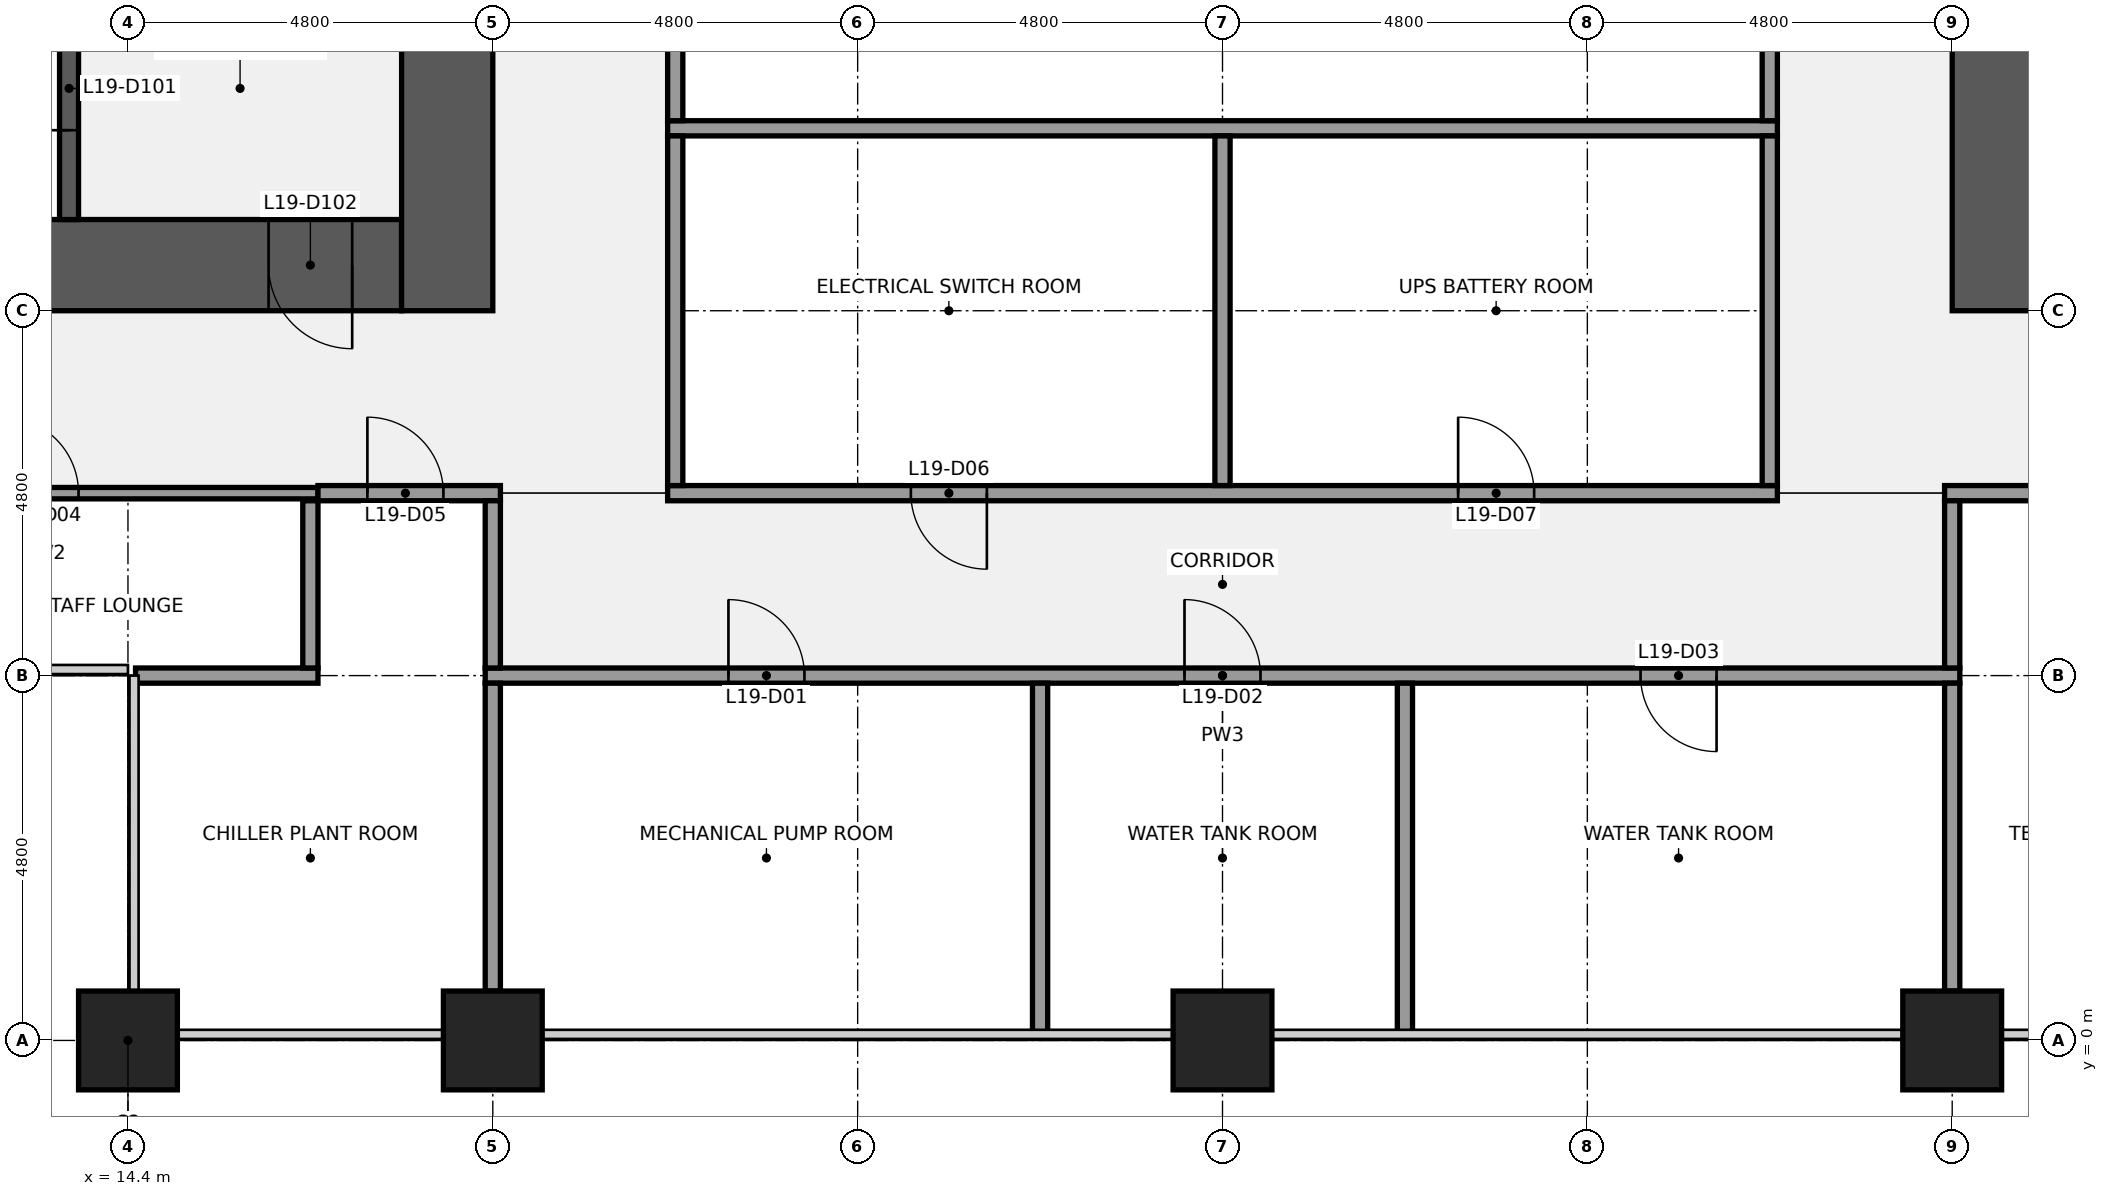
"""IFC4 building model, lengths in metres.
Left out: names, types, materials, properties, quantities, classifications, styles, units other than length and angle.
Written with IfcOpenShell. Run it as: python <this file> out.ifc"""

import sys

from ifc_helpers import new_model, si_unit, direction, frame, frame_2d, origin, origin_2d, place, context, subcontext, project, spatial, rectangle, extrude, element, fill, save


model = new_model("IFC4")
c1 = context("Model", 3, precision=1e-05, world=origin(), true_north=direction((0.0, 1.0)))
c2 = subcontext(c1, "Body", "Model", "MODEL_VIEW")
j1 = project(units=[si_unit("LENGTHUNIT", "METRE"), si_unit("PLANEANGLEUNIT", "RADIAN")], contexts=[c1])
p1 = place(None, origin())
s1 = spatial("IfcSite", under=j1, at=p1, CompositionType="ELEMENT")
p2 = place(p1, origin())
s2 = spatial("IfcBuilding", under=s1, at=p2, CompositionType="ELEMENT")
p3 = place(p2, frame((0.0, 0.0, 87.0)))
s3 = spatial("IfcBuildingStorey", under=s2, at=p3, CompositionType="ELEMENT", Elevation=87.0)
for number, where, z_axis, x_axis in (
    (1, (14.4, 0.0, 0.0), (0.0, 0.0, 1.0), (1.0, 0.0, 0.0)),
    (2, (19.2, 0.0, 0.0), (0.0, 0.0, 1.0), (1.0, 0.0, 0.0)),
    (3, (28.8, 0.0, 0.0), (0.0, 0.0, 1.0), (1.0, 0.0, 0.0)),
    (4, (38.4, 0.0, 0.0), (0.0, 0.0, 1.0), (1.0, 0.0, 0.0)),
):
    element("IfcColumn", number, at=place(p3, frame(where, z_axis=z_axis, x_axis=x_axis)), inside=s3, PredefinedType="COLUMN", context=c2, shape_type="SweptSolid", body=[
        extrude(rectangle(XDim=1.3, YDim=1.3, at=origin_2d()), origin(), (0.0, 0.0, 1.0), 4.5),
    ])
p4 = place(p3, frame((18.0, 10.2, 0.0), z_axis=(0.0, 0.0, 1.0), x_axis=(-1.0, 0.0, 0.0)))
e5 = element("IfcWall", 5, at=p4, inside=s3, PredefinedType="SHEAR", context=c2, shape_type="SweptSolid", body=[
    extrude(rectangle(XDim=8.4, YDim=1.2, at=frame_2d((4.2, 0.0))), origin(), (0.0, 0.0, 1.0), 4.1),
])
p5 = place(p4, frame((0.65, 0.0, 0.0)))
e6 = element("IfcOpeningElement", 6, at=p5, cuts=e5, PredefinedType="OPENING", context=c2, shape_type="SweptSolid", body=[
    extrude(rectangle(XDim=1.1, YDim=2.1, at=frame_2d((0.55, 1.05))), frame((0.0, 0.61, 0.0), z_axis=(0.0, -1.0, 0.0), x_axis=(1.0, 0.0, 0.0)), (0.0, 0.0, 1.0), 1.22),
])
p6 = place(p3, frame((18.6, 38.4, 0.0), z_axis=(0.0, 0.0, 1.0), x_axis=(0.0, -1.0, 0.0)))
e7 = element("IfcWall", 7, at=p6, inside=s3, PredefinedType="SHEAR", context=c2, shape_type="SweptSolid", body=[
    extrude(rectangle(XDim=28.8, YDim=1.2, at=frame_2d((14.4, 0.0))), origin(), (0.0, 0.0, 1.0), 4.1),
])
p7 = place(p6, frame((18.3, 0.0, 0.0)))
e8 = element("IfcOpeningElement", 8, at=p7, cuts=e7, PredefinedType="OPENING", context=c2, shape_type="SweptSolid", body=[
    extrude(rectangle(XDim=1.8, YDim=2.1, at=frame_2d((0.9, 1.05))), frame((0.0, 0.61, 0.0), z_axis=(0.0, -1.0, 0.0), x_axis=(1.0, 0.0, 0.0)), (0.0, 0.0, 1.0), 1.22),
])
p8 = place(p6, frame((8.7, 0.0, 0.0)))
e9 = element("IfcOpeningElement", 9, at=p8, cuts=e7, PredefinedType="OPENING", context=c2, shape_type="SweptSolid", body=[
    extrude(rectangle(XDim=1.8, YDim=2.1, at=frame_2d((0.9, 1.05))), frame((0.0, 0.61, 0.0), z_axis=(0.0, -1.0, 0.0), x_axis=(1.0, 0.0, 0.0)), (0.0, 0.0, 1.0), 1.22),
])
p9 = place(p3, frame((13.625, 10.8, 0.0), z_axis=(0.0, 0.0, 1.0), x_axis=(0.0, 1.0, 0.0)))
e10 = element("IfcWall", 10, at=p9, inside=s3, PredefinedType="SHEAR", context=c2, shape_type="SweptSolid", body=[
    extrude(rectangle(XDim=3.45, YDim=0.25, at=frame_2d((1.725, 0.0))), origin(), (0.0, 0.0, 1.0), 4.1),
])
p10 = place(p9, frame((1.175, 0.0, 0.0)))
e11 = element("IfcOpeningElement", 11, at=p10, cuts=e10, PredefinedType="OPENING", context=c2, shape_type="SweptSolid", body=[
    extrude(rectangle(XDim=1.1, YDim=2.1, at=frame_2d((0.55, 1.05))), frame((0.0, 0.135, 0.0), z_axis=(0.0, -1.0, 0.0), x_axis=(1.0, 0.0, 0.0)), (0.0, 0.0, 1.0), 0.27),
])
p11 = place(p3, frame((39.0, 9.6, 0.0), z_axis=(0.0, 0.0, 1.0), x_axis=(0.0, 1.0, 0.0)))
e12 = element("IfcWall", 12, at=p11, inside=s3, PredefinedType="SHEAR", context=c2, shape_type="SweptSolid", body=[
    extrude(rectangle(XDim=28.8, YDim=1.2, at=frame_2d((14.4, 0.0))), origin(), (0.0, 0.0, 1.0), 4.1),
])
p12 = place(p11, frame((8.7, 0.0, 0.0)))
e13 = element("IfcOpeningElement", 13, at=p12, cuts=e12, PredefinedType="OPENING", context=c2, shape_type="SweptSolid", body=[
    extrude(rectangle(XDim=1.8, YDim=2.1, at=frame_2d((0.9, 1.05))), frame((0.0, 0.61, 0.0), z_axis=(0.0, -1.0, 0.0), x_axis=(1.0, 0.0, 0.0)), (0.0, 0.0, 1.0), 1.22),
])
p13 = place(p11, frame((18.3, 0.0, 0.0)))
e14 = element("IfcOpeningElement", 14, at=p13, cuts=e12, PredefinedType="OPENING", context=c2, shape_type="SweptSolid", body=[
    extrude(rectangle(XDim=1.8, YDim=2.1, at=frame_2d((0.9, 1.05))), frame((0.0, 0.61, 0.0), z_axis=(0.0, -1.0, 0.0), x_axis=(1.0, 0.0, 0.0)), (0.0, 0.0, 1.0), 1.22),
])
p14 = place(p3, frame((14.5, 4.8, 0.0), z_axis=(0.0, 0.0, 1.0), x_axis=(1.0, 0.0, 0.0)))
e15 = element("IfcWall", 15, at=p14, inside=s3, PredefinedType="PARTITIONING", context=c2, shape_type="SweptSolid", body=[
    extrude(rectangle(XDim=2.4, YDim=0.2, at=frame_2d((1.2, 0.0))), origin(), (0.0, 0.0, 1.0), 2.993),
])
p15 = place(p3, frame((19.1, 4.8, 0.0), z_axis=(0.0, 0.0, 1.0), x_axis=(1.0, 0.0, 0.0)))
e16 = element("IfcWall", 16, at=p15, inside=s3, PredefinedType="PARTITIONING", context=c2, shape_type="SweptSolid", body=[
    extrude(rectangle(XDim=19.4, YDim=0.2, at=frame_2d((9.7, 0.0))), origin(), (0.0, 0.0, 1.0), 2.993),
])
p16 = place(p15, frame((3.2, 0.0, 0.0)))
e17 = element("IfcOpeningElement", 17, at=p16, cuts=e16, PredefinedType="OPENING", context=c2, shape_type="SweptSolid", body=[
    extrude(rectangle(XDim=1.0, YDim=2.1, at=frame_2d((0.5, 1.05))), frame((0.0, 0.11, 0.0), z_axis=(0.0, -1.0, 0.0), x_axis=(1.0, 0.0, 0.0)), (0.0, 0.0, 1.0), 0.22),
])
p17 = place(p15, frame((9.2, 0.0, 0.0)))
e18 = element("IfcOpeningElement", 18, at=p17, cuts=e16, PredefinedType="OPENING", context=c2, shape_type="SweptSolid", body=[
    extrude(rectangle(XDim=1.0, YDim=2.1, at=frame_2d((0.5, 1.05))), frame((0.0, 0.11, 0.0), z_axis=(0.0, -1.0, 0.0), x_axis=(1.0, 0.0, 0.0)), (0.0, 0.0, 1.0), 0.22),
])
p18 = place(p15, frame((15.2, 0.0, 0.0)))
e19 = element("IfcOpeningElement", 19, at=p18, cuts=e16, PredefinedType="OPENING", context=c2, shape_type="SweptSolid", body=[
    extrude(rectangle(XDim=1.0, YDim=2.1, at=frame_2d((0.5, 1.05))), frame((0.0, 0.11, 0.0), z_axis=(0.0, -1.0, 0.0), x_axis=(1.0, 0.0, 0.0)), (0.0, 0.0, 1.0), 0.22),
])
p19 = place(p3, frame((9.7, 7.2, 0.0), z_axis=(0.0, 0.0, 1.0), x_axis=(1.0, 0.0, 0.0)))
e20 = element("IfcWall", 20, at=p19, inside=s3, PredefinedType="PARTITIONING", context=c2, shape_type="SweptSolid", body=[
    extrude(rectangle(XDim=7.2, YDim=0.15, at=frame_2d((3.6, 0.0))), origin(), (0.0, 0.0, 1.0), 2.993),
])
p20 = place(p19, frame((3.05, 0.0, 0.0)))
e21 = element("IfcOpeningElement", 21, at=p20, cuts=e20, PredefinedType="OPENING", context=c2, shape_type="SweptSolid", body=[
    extrude(rectangle(XDim=1.0, YDim=2.1, at=frame_2d((0.5, 1.05))), frame((0.0, 0.085, 0.0), z_axis=(0.0, -1.0, 0.0), x_axis=(1.0, 0.0, 0.0)), (0.0, 0.0, 1.0), 0.17),
])
p21 = place(p3, frame((16.9, 7.2, 0.0), z_axis=(0.0, 0.0, 1.0), x_axis=(1.0, 0.0, 0.0)))
e22 = element("IfcWall", 22, at=p21, inside=s3, PredefinedType="PARTITIONING", context=c2, shape_type="SweptSolid", body=[
    extrude(rectangle(XDim=2.4, YDim=0.2, at=frame_2d((1.2, 0.0))), origin(), (0.0, 0.0, 1.0), 2.993),
])
p22 = place(p21, frame((0.65, 0.0, 0.0)))
e23 = element("IfcOpeningElement", 23, at=p22, cuts=e22, PredefinedType="OPENING", context=c2, shape_type="SweptSolid", body=[
    extrude(rectangle(XDim=1.0, YDim=2.1, at=frame_2d((0.5, 1.05))), frame((0.0, 0.11, 0.0), z_axis=(0.0, -1.0, 0.0), x_axis=(1.0, 0.0, 0.0)), (0.0, 0.0, 1.0), 0.22),
])
p23 = place(p3, frame((21.5, 7.2, 0.0), z_axis=(0.0, 0.0, 1.0), x_axis=(1.0, 0.0, 0.0)))
e24 = element("IfcWall", 24, at=p23, inside=s3, PredefinedType="PARTITIONING", context=c2, shape_type="SweptSolid", body=[
    extrude(rectangle(XDim=14.6, YDim=0.2, at=frame_2d((7.3, 0.0))), origin(), (0.0, 0.0, 1.0), 2.993),
])
p24 = place(p23, frame((3.2, 0.0, 0.0)))
e25 = element("IfcOpeningElement", 25, at=p24, cuts=e24, PredefinedType="OPENING", context=c2, shape_type="SweptSolid", body=[
    extrude(rectangle(XDim=1.0, YDim=2.1, at=frame_2d((0.5, 1.05))), frame((0.0, 0.11, 0.0), z_axis=(0.0, -1.0, 0.0), x_axis=(1.0, 0.0, 0.0)), (0.0, 0.0, 1.0), 0.22),
])
p25 = place(p23, frame((10.4, 0.0, 0.0)))
e26 = element("IfcOpeningElement", 26, at=p25, cuts=e24, PredefinedType="OPENING", context=c2, shape_type="SweptSolid", body=[
    extrude(rectangle(XDim=1.0, YDim=2.1, at=frame_2d((0.5, 1.05))), frame((0.0, 0.11, 0.0), z_axis=(0.0, -1.0, 0.0), x_axis=(1.0, 0.0, 0.0)), (0.0, 0.0, 1.0), 0.22),
])
p26 = place(p3, frame((38.3, 7.2, 0.0), z_axis=(0.0, 0.0, 1.0), x_axis=(1.0, 0.0, 0.0)))
e27 = element("IfcWall", 27, at=p26, inside=s3, PredefinedType="PARTITIONING", context=c2, shape_type="SweptSolid", body=[
    extrude(rectangle(XDim=14.4, YDim=0.2, at=frame_2d((7.2, 0.0))), origin(), (0.0, 0.0, 1.0), 2.993),
])
p27 = place(p26, frame((3.2, 0.0, 0.0)))
e28 = element("IfcOpeningElement", 28, at=p27, cuts=e27, PredefinedType="OPENING", context=c2, shape_type="SweptSolid", body=[
    extrude(rectangle(XDim=1.0, YDim=2.1, at=frame_2d((0.5, 1.05))), frame((0.0, 0.11, 0.0), z_axis=(0.0, -1.0, 0.0), x_axis=(1.0, 0.0, 0.0)), (0.0, 0.0, 1.0), 0.22),
])
p28 = place(p26, frame((10.35, 0.0, 0.0)))
e29 = element("IfcOpeningElement", 29, at=p28, cuts=e27, PredefinedType="OPENING", context=c2, shape_type="SweptSolid", body=[
    extrude(rectangle(XDim=1.0, YDim=2.1, at=frame_2d((0.5, 1.05))), frame((0.0, 0.11, 0.0), z_axis=(0.0, -1.0, 0.0), x_axis=(1.0, 0.0, 0.0)), (0.0, 0.0, 1.0), 0.22),
])
p29 = place(p3, frame((21.5, 12.0, 0.0), z_axis=(0.0, 0.0, 1.0), x_axis=(1.0, 0.0, 0.0)))
e30 = element("IfcWall", 30, at=p29, inside=s3, PredefinedType="PARTITIONING", context=c2, shape_type="SweptSolid", body=[
    extrude(rectangle(XDim=14.6, YDim=0.2, at=frame_2d((7.3, 0.0))), origin(), (0.0, 0.0, 1.0), 2.993),
])
p30 = place(p3, frame((16.8, 4.9, 0.0), z_axis=(0.0, 0.0, 1.0), x_axis=(0.0, 1.0, 0.0)))
e31 = element("IfcWall", 31, at=p30, inside=s3, PredefinedType="PARTITIONING", context=c2, shape_type="SweptSolid", body=[
    extrude(rectangle(XDim=2.2, YDim=0.2, at=frame_2d((1.1, 0.0))), origin(), (0.0, 0.0, 1.0), 2.993),
])
p31 = place(p3, frame((19.2, 0.65, 0.0), z_axis=(0.0, 0.0, 1.0), x_axis=(0.0, 1.0, 0.0)))
e32 = element("IfcWall", 32, at=p31, inside=s3, PredefinedType="PARTITIONING", context=c2, shape_type="SweptSolid", body=[
    extrude(rectangle(XDim=4.05, YDim=0.2, at=frame_2d((2.025, 0.0))), origin(), (0.0, 0.0, 1.0), 2.993),
])
p32 = place(p3, frame((19.2, 4.9, 0.0), z_axis=(0.0, 0.0, 1.0), x_axis=(0.0, 1.0, 0.0)))
e33 = element("IfcWall", 33, at=p32, inside=s3, PredefinedType="PARTITIONING", context=c2, shape_type="SweptSolid", body=[
    extrude(rectangle(XDim=2.2, YDim=0.2, at=frame_2d((1.1, 0.0))), origin(), (0.0, 0.0, 1.0), 2.993),
])
p33 = place(p3, frame((21.6, 7.3, 0.0), z_axis=(0.0, 0.0, 1.0), x_axis=(0.0, 1.0, 0.0)))
e34 = element("IfcWall", 34, at=p33, inside=s3, PredefinedType="PARTITIONING", context=c2, shape_type="SweptSolid", body=[
    extrude(rectangle(XDim=4.6, YDim=0.2, at=frame_2d((2.3, 0.0))), origin(), (0.0, 0.0, 1.0), 2.993),
])
p34 = place(p3, frame((21.6, 12.1, 0.0), z_axis=(0.0, 0.0, 1.0), x_axis=(0.0, 1.0, 0.0)))
e35 = element("IfcWall", 35, at=p34, inside=s3, PredefinedType="PARTITIONING", context=c2, shape_type="SweptSolid", body=[
    extrude(rectangle(XDim=7.0, YDim=0.2, at=frame_2d((3.5, 0.0))), origin(), (0.0, 0.0, 1.0), 2.993),
])
p35 = place(p34, frame((3.0, 0.0, 0.0)))
e36 = element("IfcOpeningElement", 36, at=p35, cuts=e35, PredefinedType="OPENING", context=c2, shape_type="SweptSolid", body=[
    extrude(rectangle(XDim=1.0, YDim=2.1, at=frame_2d((0.5, 1.05))), frame((0.0, 0.11, 0.0), z_axis=(0.0, -1.0, 0.0), x_axis=(1.0, 0.0, 0.0)), (0.0, 0.0, 1.0), 0.22),
])
for number, where, z_axis, x_axis in (
    (37, (26.4, 0.1, 0.0), (0.0, 0.0, 1.0), (0.0, 1.0, 0.0)),
    (38, (28.8, 7.3, 0.0), (0.0, 0.0, 1.0), (0.0, 1.0, 0.0)),
    (39, (31.2, 0.1, 0.0), (0.0, 0.0, 1.0), (0.0, 1.0, 0.0)),
    (40, (36.0, 7.3, 0.0), (0.0, 0.0, 1.0), (0.0, 1.0, 0.0)),
):
    element("IfcWall", number, at=place(p3, frame(where, z_axis=z_axis, x_axis=x_axis)), inside=s3, PredefinedType="PARTITIONING", context=c2, shape_type="SweptSolid", body=[
        extrude(rectangle(XDim=4.6, YDim=0.2, at=frame_2d((2.3, 0.0))), origin(), (0.0, 0.0, 1.0), 2.993),
    ])
p36 = place(p3, frame((36.0, 12.1, 0.0), z_axis=(0.0, 0.0, 1.0), x_axis=(0.0, 1.0, 0.0)))
e41 = element("IfcWall", 41, at=p36, inside=s3, PredefinedType="PARTITIONING", context=c2, shape_type="SweptSolid", body=[
    extrude(rectangle(XDim=7.0, YDim=0.2, at=frame_2d((3.5, 0.0))), origin(), (0.0, 0.0, 1.0), 2.993),
])
p37 = place(p3, frame((38.4, 0.65, 0.0), z_axis=(0.0, 0.0, 1.0), x_axis=(0.0, 1.0, 0.0)))
e42 = element("IfcWall", 42, at=p37, inside=s3, PredefinedType="PARTITIONING", context=c2, shape_type="SweptSolid", body=[
    extrude(rectangle(XDim=4.05, YDim=0.2, at=frame_2d((2.025, 0.0))), origin(), (0.0, 0.0, 1.0), 2.993),
])
p38 = place(p3, frame((38.4, 4.9, 0.0), z_axis=(0.0, 0.0, 1.0), x_axis=(0.0, 1.0, 0.0)))
e43 = element("IfcWall", 43, at=p38, inside=s3, PredefinedType="PARTITIONING", context=c2, shape_type="SweptSolid", body=[
    extrude(rectangle(XDim=2.2, YDim=0.2, at=frame_2d((1.1, 0.0))), origin(), (0.0, 0.0, 1.0), 2.993),
])
for number, where, z_axis, x_axis in (
    (44, (14.4, -1.075, 0.0), (0.0, 0.0, 1.0), (1.0, 0.0, 0.0)),
    (45, (19.2, -1.075, 0.0), (0.0, 0.0, 1.0), (1.0, 0.0, 0.0)),
    (46, (38.4, -1.075, 0.0), (0.0, 0.0, 1.0), (1.0, 0.0, 0.0)),
):
    element("IfcColumn", number, at=place(p3, frame(where, z_axis=z_axis, x_axis=x_axis)), inside=s3, PredefinedType="PILASTER", context=c2, shape_type="SweptSolid", body=[
        extrude(rectangle(XDim=4.2, YDim=0.85, at=origin_2d()), origin(), (0.0, 0.0, 1.0), 4.5),
    ])
p39 = place(p10, origin())
e47 = element("IfcDoor", 47, at=p39, inside=s3, OperationType="SINGLE_SWING_LEFT", PredefinedType="DOOR", context=c2, shape_type="SweptSolid", body=[
    extrude(rectangle(XDim=1.1, YDim=2.1, at=frame_2d((0.55, 1.05))), frame((0.0, 0.025, 0.0), z_axis=(0.0, -1.0, 0.0), x_axis=(1.0, 0.0, 0.0)), (0.0, 0.0, 1.0), 0.05),
])
fill(e11, e47)
p40 = place(p5, origin())
e48 = element("IfcDoor", 48, at=p40, inside=s3, OperationType="SINGLE_SWING_LEFT", PredefinedType="DOOR", context=c2, shape_type="SweptSolid", body=[
    extrude(rectangle(XDim=1.1, YDim=2.1, at=frame_2d((0.55, 1.05))), frame((0.0, 0.025, 0.0), z_axis=(0.0, -1.0, 0.0), x_axis=(1.0, 0.0, 0.0)), (0.0, 0.0, 1.0), 0.05),
])
fill(e6, e48)
p41 = place(p16, origin())
e49 = element("IfcDoor", 49, at=p41, inside=s3, OperationType="SINGLE_SWING_LEFT", PredefinedType="DOOR", context=c2, shape_type="SweptSolid", body=[
    extrude(rectangle(XDim=1.0, YDim=2.1, at=frame_2d((0.5, 1.05))), frame((0.0, 0.025, 0.0), z_axis=(0.0, -1.0, 0.0), x_axis=(1.0, 0.0, 0.0)), (0.0, 0.0, 1.0), 0.05),
])
fill(e17, e49)
p42 = place(p17, origin())
e50 = element("IfcDoor", 50, at=p42, inside=s3, OperationType="SINGLE_SWING_LEFT", PredefinedType="DOOR", context=c2, shape_type="SweptSolid", body=[
    extrude(rectangle(XDim=1.0, YDim=2.1, at=frame_2d((0.5, 1.05))), frame((0.0, 0.025, 0.0), z_axis=(0.0, -1.0, 0.0), x_axis=(1.0, 0.0, 0.0)), (0.0, 0.0, 1.0), 0.05),
])
fill(e18, e50)
p43 = place(p18, origin())
e51 = element("IfcDoor", 51, at=p43, inside=s3, OperationType="SINGLE_SWING_RIGHT", PredefinedType="DOOR", context=c2, shape_type="SweptSolid", body=[
    extrude(rectangle(XDim=1.0, YDim=2.1, at=frame_2d((0.5, 1.05))), frame((0.0, 0.025, 0.0), z_axis=(0.0, -1.0, 0.0), x_axis=(1.0, 0.0, 0.0)), (0.0, 0.0, 1.0), 0.05),
])
fill(e19, e51)
p44 = place(p20, origin())
e52 = element("IfcDoor", 52, at=p44, inside=s3, OperationType="SINGLE_SWING_LEFT", PredefinedType="DOOR", context=c2, shape_type="SweptSolid", body=[
    extrude(rectangle(XDim=1.0, YDim=2.1, at=frame_2d((0.5, 1.05))), frame((0.0, 0.025, 0.0), z_axis=(0.0, -1.0, 0.0), x_axis=(1.0, 0.0, 0.0)), (0.0, 0.0, 1.0), 0.05),
])
fill(e21, e52)
p45 = place(p22, origin())
e53 = element("IfcDoor", 53, at=p45, inside=s3, OperationType="SINGLE_SWING_LEFT", PredefinedType="DOOR", context=c2, shape_type="SweptSolid", body=[
    extrude(rectangle(XDim=1.0, YDim=2.1, at=frame_2d((0.5, 1.05))), frame((0.0, 0.025, 0.0), z_axis=(0.0, -1.0, 0.0), x_axis=(1.0, 0.0, 0.0)), (0.0, 0.0, 1.0), 0.05),
])
fill(e23, e53)
p46 = place(p24, origin())
e54 = element("IfcDoor", 54, at=p46, inside=s3, OperationType="SINGLE_SWING_RIGHT", PredefinedType="DOOR", context=c2, shape_type="SweptSolid", body=[
    extrude(rectangle(XDim=1.0, YDim=2.1, at=frame_2d((0.5, 1.05))), frame((0.0, 0.025, 0.0), z_axis=(0.0, -1.0, 0.0), x_axis=(1.0, 0.0, 0.0)), (0.0, 0.0, 1.0), 0.05),
])
fill(e25, e54)
p47 = place(p25, origin())
e55 = element("IfcDoor", 55, at=p47, inside=s3, OperationType="SINGLE_SWING_LEFT", PredefinedType="DOOR", context=c2, shape_type="SweptSolid", body=[
    extrude(rectangle(XDim=1.0, YDim=2.1, at=frame_2d((0.5, 1.05))), frame((0.0, 0.025, 0.0), z_axis=(0.0, -1.0, 0.0), x_axis=(1.0, 0.0, 0.0)), (0.0, 0.0, 1.0), 0.05),
])
fill(e26, e55)
save(model, sys.argv[1])
